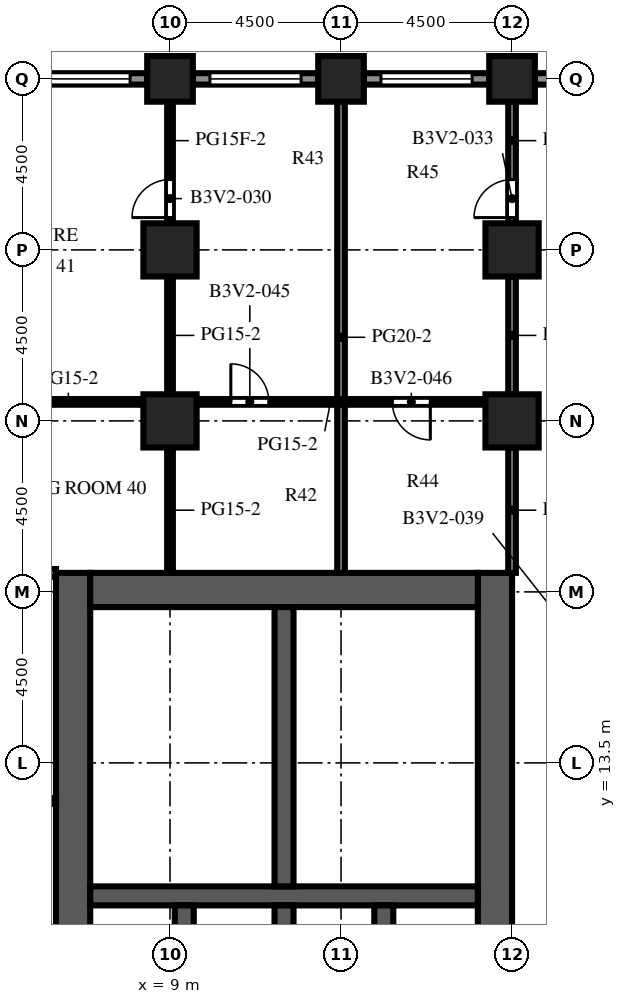
"""IFC4 building model, lengths in metres.
Left out: names, types, materials, properties, quantities, classifications, styles, units other than length and angle.
Written with IfcOpenShell. Run it as: python <this file> out.ifc"""

import sys

from ifc_helpers import new_model, si_unit, direction, frame, frame_2d, origin, origin_2d, place, context, subcontext, project, spatial, rectangle, extrude, element, fill, save


model = new_model("IFC4")
c1 = context("Model", 3, precision=1e-05, world=origin(), true_north=direction((0.0, 1.0)))
c2 = subcontext(c1, "Body", "Model", "MODEL_VIEW")
j1 = project(units=[si_unit("LENGTHUNIT", "METRE"), si_unit("PLANEANGLEUNIT", "RADIAN")], contexts=[c1])
p1 = place(None, origin())
s1 = spatial("IfcSite", under=j1, at=p1, CompositionType="ELEMENT")
p2 = place(p1, origin())
s2 = spatial("IfcBuilding", under=s1, at=p2, CompositionType="ELEMENT")
p3 = place(p2, frame((0.0, 0.0, 106.6)))
s3 = spatial("IfcBuildingStorey", under=s2, at=p3, CompositionType="ELEMENT", Elevation=106.6)
for number, where, z_axis, x_axis in (
    (1, (9.0, 31.5, 0.0), (0.0, 0.0, 1.0), (1.0, 0.0, 0.0)),
    (2, (13.5, 31.5, 0.0), (0.0, 0.0, 1.0), (1.0, 0.0, 0.0)),
    (3, (18.0, 31.5, 0.0), (0.0, 0.0, 1.0), (1.0, 0.0, 0.0)),
):
    element("IfcColumn", number, at=place(p3, frame(where, z_axis=z_axis, x_axis=x_axis)), inside=s3, PredefinedType="COLUMN", context=c2, shape_type="SweptSolid", body=[
        extrude(rectangle(XDim=1.2, YDim=1.2, at=origin_2d()), origin(), (0.0, 0.0, 1.0), 4.1),
    ])
for number, where, z_axis, x_axis in (
    (4, (9.0, 22.5, 0.0), (0.0, 0.0, 1.0), (1.0, 0.0, 0.0)),
    (5, (9.0, 27.0, 0.0), (0.0, 0.0, 1.0), (1.0, 0.0, 0.0)),
    (6, (18.0, 22.5, 0.0), (0.0, 0.0, 1.0), (1.0, 0.0, 0.0)),
    (7, (18.0, 27.0, 0.0), (0.0, 0.0, 1.0), (1.0, 0.0, 0.0)),
):
    element("IfcColumn", number, at=place(p3, frame(where, z_axis=z_axis, x_axis=x_axis)), inside=s3, PredefinedType="COLUMN", context=c2, shape_type="SweptSolid", body=[
        extrude(rectangle(XDim=1.4, YDim=1.4, at=origin_2d()), origin(), (0.0, 0.0, 1.0), 4.1),
    ])
p4 = place(p3, frame((6.45, -9.0, 0.0), z_axis=(0.0, 0.0, 1.0), x_axis=(0.0, 1.0, 0.0)))
e8 = element("IfcWall", 8, at=p4, inside=s3, PredefinedType="SHEAR", context=c2, shape_type="SweptSolid", body=[
    extrude(rectangle(XDim=27.5, YDim=0.9, at=frame_2d((13.75, 0.0))), origin(), (0.0, 0.0, 1.0), 4.1),
])
p5 = place(p4, frame((12.55, 0.0, 0.0)))
e9 = element("IfcOpeningElement", 9, at=p5, cuts=e8, PredefinedType="OPENING", context=c2, shape_type="SweptSolid", body=[
    extrude(rectangle(XDim=2.4, YDim=2.4, at=frame_2d((1.2, 1.2))), frame((0.0, 0.46, 0.0), z_axis=(0.0, -1.0, 0.0), x_axis=(1.0, 0.0, 0.0)), (0.0, 0.0, 1.0), 0.92),
])
p6 = place(p4, frame((3.893, 0.0, 0.0)))
e10 = element("IfcOpeningElement", 10, at=p6, cuts=e8, PredefinedType="OPENING", context=c2, shape_type="SweptSolid", body=[
    extrude(rectangle(XDim=0.923, YDim=2.1, at=frame_2d((0.461, 1.05))), frame((0.0, 0.46, 0.0), z_axis=(0.0, -1.0, 0.0), x_axis=(1.0, 0.0, 0.0)), (0.0, 0.0, 1.0), 0.92),
])
p7 = place(p4, frame((23.427, 0.0, 0.0)))
e11 = element("IfcOpeningElement", 11, at=p7, cuts=e8, PredefinedType="OPENING", context=c2, shape_type="SweptSolid", body=[
    extrude(rectangle(XDim=1.2, YDim=2.1, at=frame_2d((0.6, 1.05))), frame((0.0, 0.46, 0.0), z_axis=(0.0, -1.0, 0.0), x_axis=(1.0, 0.0, 0.0)), (0.0, 0.0, 1.0), 0.92),
])
p8 = place(p3, frame((17.55, -9.0, 0.0), z_axis=(0.0, 0.0, 1.0), x_axis=(0.0, 1.0, 0.0)))
e12 = element("IfcWall", 12, at=p8, inside=s3, PredefinedType="SHEAR", context=c2, shape_type="SweptSolid", body=[
    extrude(rectangle(XDim=27.5, YDim=0.9, at=frame_2d((13.75, 0.0))), origin(), (0.0, 0.0, 1.0), 4.1),
])
p9 = place(p8, frame((12.55, 0.0, 0.0)))
e13 = element("IfcOpeningElement", 13, at=p9, cuts=e12, PredefinedType="OPENING", context=c2, shape_type="SweptSolid", body=[
    extrude(rectangle(XDim=2.4, YDim=2.4, at=frame_2d((1.2, 1.2))), frame((0.0, 0.46, 0.0), z_axis=(0.0, -1.0, 0.0), x_axis=(1.0, 0.0, 0.0)), (0.0, 0.0, 1.0), 0.92),
])
p10 = place(p8, frame((6.825, 0.0, 0.0)))
e14 = element("IfcOpeningElement", 14, at=p10, cuts=e12, PredefinedType="OPENING", context=c2, shape_type="SweptSolid", body=[
    extrude(rectangle(XDim=1.2, YDim=2.1, at=frame_2d((0.6, 1.05))), frame((0.0, 0.46, 0.0), z_axis=(0.0, -1.0, 0.0), x_axis=(1.0, 0.0, 0.0)), (0.0, 0.0, 1.0), 0.92),
])
p11 = place(p8, frame((19.475, 0.0, 0.0)))
e15 = element("IfcOpeningElement", 15, at=p11, cuts=e12, PredefinedType="OPENING", context=c2, shape_type="SweptSolid", body=[
    extrude(rectangle(XDim=1.2, YDim=2.1, at=frame_2d((0.6, 1.05))), frame((0.0, 0.46, 0.0), z_axis=(0.0, -1.0, 0.0), x_axis=(1.0, 0.0, 0.0)), (0.0, 0.0, 1.0), 0.92),
])
p12 = place(p3, frame((6.9, 18.05, 0.0), z_axis=(0.0, 0.0, 1.0), x_axis=(1.0, 0.0, 0.0)))
e16 = element("IfcWall", 16, at=p12, inside=s3, PredefinedType="SHEAR", context=c2, shape_type="SweptSolid", body=[
    extrude(rectangle(XDim=10.2, YDim=0.9, at=frame_2d((5.1, 0.0))), origin(), (0.0, 0.0, 1.0), 4.1),
])
p13 = place(p3, frame((6.9, 10.0, 0.0), z_axis=(0.0, 0.0, 1.0), x_axis=(1.0, 0.0, 0.0)))
e17 = element("IfcWall", 17, at=p13, inside=s3, PredefinedType="SHEAR", context=c2, shape_type="SweptSolid", body=[
    extrude(rectangle(XDim=10.2, YDim=0.5, at=frame_2d((5.1, 0.0))), origin(), (0.0, 0.0, 1.0), 4.1),
])
for number, where, z_axis, x_axis in (
    (18, (9.375, 6.95, 0.0), (0.0, 0.0, 1.0), (0.0, 1.0, 0.0)),
    (19, (12.0, 6.95, 0.0), (0.0, 0.0, 1.0), (0.0, 1.0, 0.0)),
    (20, (14.625, 6.95, 0.0), (0.0, 0.0, 1.0), (0.0, 1.0, 0.0)),
):
    element("IfcWall", number, at=place(p3, frame(where, z_axis=z_axis, x_axis=x_axis)), inside=s3, PredefinedType="SHEAR", context=c2, shape_type="SweptSolid", body=[
        extrude(rectangle(XDim=2.8, YDim=0.5, at=frame_2d((1.4, 0.0))), origin(), (0.0, 0.0, 1.0), 4.1),
    ])
p14 = place(p3, frame((12.0, 10.25, 0.0), z_axis=(0.0, 0.0, 1.0), x_axis=(0.0, 1.0, 0.0)))
e21 = element("IfcWall", 21, at=p14, inside=s3, PredefinedType="SHEAR", context=c2, shape_type="SweptSolid", body=[
    extrude(rectangle(XDim=7.35, YDim=0.5, at=frame_2d((3.675, 0.0))), origin(), (0.0, 0.0, 1.0), 4.1),
])
p15 = place(p3, frame((18.6, 31.5, 0.0), z_axis=(0.0, 0.0, 1.0), x_axis=(1.0, 0.0, 0.0)))
e22 = element("IfcWall", 22, at=p15, inside=s3, PredefinedType="SOLIDWALL", context=c2, shape_type="SweptSolid", body=[
    extrude(rectangle(XDim=3.3, YDim=0.3, at=frame_2d((1.65, 0.0))), origin(), (0.0, 0.0, 1.0), 2.6),
])
p16 = place(p15, frame((1.15, 0.0, 0.0)))
e23 = element("IfcOpeningElement", 23, at=p16, cuts=e22, PredefinedType="OPENING", context=c2, shape_type="SweptSolid", body=[
    extrude(rectangle(XDim=1.0, YDim=2.2, at=frame_2d((0.5, 1.1))), frame((0.0, 0.16, 0.0), z_axis=(0.0, -1.0, 0.0), x_axis=(1.0, 0.0, 0.0)), (0.0, 0.0, 1.0), 0.32),
])
p17 = place(p3, frame((14.1, 31.5, 0.0), z_axis=(0.0, 0.0, 1.0), x_axis=(1.0, 0.0, 0.0)))
e24 = element("IfcWall", 24, at=p17, inside=s3, PredefinedType="SOLIDWALL", context=c2, shape_type="SweptSolid", body=[
    extrude(rectangle(XDim=3.3, YDim=0.3, at=frame_2d((1.65, 0.0))), origin(), (0.0, 0.0, 1.0), 2.6),
])
p18 = place(p17, frame((0.45, 0.0, 0.8)))
e25 = element("IfcOpeningElement", 25, at=p18, cuts=e24, PredefinedType="OPENING", context=c2, shape_type="SweptSolid", body=[
    extrude(rectangle(XDim=2.4, YDim=1.7, at=frame_2d((1.2, 0.85))), frame((0.0, 0.16, 0.0), z_axis=(0.0, -1.0, 0.0), x_axis=(1.0, 0.0, 0.0)), (0.0, 0.0, 1.0), 0.32),
])
p19 = place(p3, frame((9.6, 31.5, 0.0), z_axis=(0.0, 0.0, 1.0), x_axis=(1.0, 0.0, 0.0)))
e26 = element("IfcWall", 26, at=p19, inside=s3, PredefinedType="SOLIDWALL", context=c2, shape_type="SweptSolid", body=[
    extrude(rectangle(XDim=3.3, YDim=0.3, at=frame_2d((1.65, 0.0))), origin(), (0.0, 0.0, 1.0), 2.6),
])
p20 = place(p19, frame((0.45, 0.0, 0.8)))
e27 = element("IfcOpeningElement", 27, at=p20, cuts=e26, PredefinedType="OPENING", context=c2, shape_type="SweptSolid", body=[
    extrude(rectangle(XDim=2.4, YDim=1.7, at=frame_2d((1.2, 0.85))), frame((0.0, 0.16, 0.0), z_axis=(0.0, -1.0, 0.0), x_axis=(1.0, 0.0, 0.0)), (0.0, 0.0, 1.0), 0.32),
])
p21 = place(p3, frame((5.1, 31.5, 0.0), z_axis=(0.0, 0.0, 1.0), x_axis=(1.0, 0.0, 0.0)))
e28 = element("IfcWall", 28, at=p21, inside=s3, PredefinedType="SOLIDWALL", context=c2, shape_type="SweptSolid", body=[
    extrude(rectangle(XDim=3.3, YDim=0.3, at=frame_2d((1.65, 0.0))), origin(), (0.0, 0.0, 1.0), 2.6),
])
p22 = place(p21, frame((0.45, 0.0, 0.8)))
e29 = element("IfcOpeningElement", 29, at=p22, cuts=e28, PredefinedType="OPENING", context=c2, shape_type="SweptSolid", body=[
    extrude(rectangle(XDim=2.4, YDim=1.7, at=frame_2d((1.2, 0.85))), frame((0.0, 0.16, 0.0), z_axis=(0.0, -1.0, 0.0), x_axis=(1.0, 0.0, 0.0)), (0.0, 0.0, 1.0), 0.32),
])
p23 = place(p3, frame((6.9, 12.455, 0.0), z_axis=(0.0, 0.0, 1.0), x_axis=(1.0, 0.0, 0.0)))
e30 = element("IfcWall", 30, at=p23, inside=s3, PredefinedType="PARTITIONING", context=c2, shape_type="SweptSolid", body=[
    extrude(rectangle(XDim=1.3, YDim=0.1, at=frame_2d((0.65, 0.0))), origin(), (0.0, 0.0, 1.0), 3.5),
])
p24 = place(p23, frame((0.2, 0.0, 0.0)))
e31 = element("IfcOpeningElement", 31, at=p24, cuts=e30, PredefinedType="OPENING", context=c2, shape_type="SweptSolid", body=[
    extrude(rectangle(XDim=0.9, YDim=2.1, at=frame_2d((0.45, 1.05))), frame((0.0, 0.06, 0.0), z_axis=(0.0, -1.0, 0.0), x_axis=(1.0, 0.0, 0.0)), (0.0, 0.0, 1.0), 0.12),
])
p25 = place(p3, frame((8.2, 12.455, 0.0), z_axis=(0.0, 0.0, 1.0), x_axis=(1.0, 0.0, 0.0)))
e32 = element("IfcWall", 32, at=p25, inside=s3, PredefinedType="PARTITIONING", context=c2, shape_type="SweptSolid", body=[
    extrude(rectangle(XDim=3.55, YDim=0.1, at=frame_2d((1.775, 0.0))), origin(), (0.0, 0.0, 1.0), 3.5),
])
p26 = place(p3, frame((8.2, 12.455, 0.0), z_axis=(0.0, 0.0, 1.0), x_axis=(0.0, 1.0, 0.0)))
e33 = element("IfcWall", 33, at=p26, inside=s3, PredefinedType="PARTITIONING", context=c2, shape_type="SweptSolid", body=[
    extrude(rectangle(XDim=2.573, YDim=0.1, at=frame_2d((1.286, 0.0))), origin(), (0.0, 0.0, 1.0), 3.5),
])
p27 = place(p26, frame((0.786, 0.0, 0.0)))
e34 = element("IfcOpeningElement", 34, at=p27, cuts=e33, PredefinedType="OPENING", context=c2, shape_type="SweptSolid", body=[
    extrude(rectangle(XDim=1.0, YDim=2.1, at=frame_2d((0.5, 1.05))), frame((0.0, 0.06, 0.0), z_axis=(0.0, -1.0, 0.0), x_axis=(1.0, 0.0, 0.0)), (0.0, 0.0, 1.0), 0.12),
])
p28 = place(p3, frame((8.2, 15.028, 0.0), z_axis=(0.0, 0.0, 1.0), x_axis=(0.0, 1.0, 0.0)))
e35 = element("IfcWall", 35, at=p28, inside=s3, PredefinedType="PARTITIONING", context=c2, shape_type="SweptSolid", body=[
    extrude(rectangle(XDim=2.573, YDim=0.1, at=frame_2d((1.286, 0.0))), origin(), (0.0, 0.0, 1.0), 3.5),
])
p29 = place(p28, frame((0.786, 0.0, 0.0)))
e36 = element("IfcOpeningElement", 36, at=p29, cuts=e35, PredefinedType="OPENING", context=c2, shape_type="SweptSolid", body=[
    extrude(rectangle(XDim=1.0, YDim=2.1, at=frame_2d((0.5, 1.05))), frame((0.0, 0.06, 0.0), z_axis=(0.0, -1.0, 0.0), x_axis=(1.0, 0.0, 0.0)), (0.0, 0.0, 1.0), 0.12),
])
p30 = place(p3, frame((8.2, 15.028, 0.0), z_axis=(0.0, 0.0, 1.0), x_axis=(1.0, 0.0, 0.0)))
e37 = element("IfcWall", 37, at=p30, inside=s3, PredefinedType="PARTITIONING", context=c2, shape_type="SweptSolid", body=[
    extrude(rectangle(XDim=3.55, YDim=0.1, at=frame_2d((1.775, 0.0))), origin(), (0.0, 0.0, 1.0), 3.5),
])
p31 = place(p3, frame((9.0, 18.5, 0.0), z_axis=(0.0, 0.0, 1.0), x_axis=(0.0, 1.0, 0.0)))
e38 = element("IfcWall", 38, at=p31, inside=s3, PredefinedType="PARTITIONING", context=c2, shape_type="SweptSolid", body=[
    extrude(rectangle(XDim=3.3, YDim=0.15, at=frame_2d((1.65, 0.0))), origin(), (0.0, 0.0, 1.0), 3.5),
])
p32 = place(p3, frame((9.0, 23.2, 0.0), z_axis=(0.0, 0.0, 1.0), x_axis=(0.0, 1.0, 0.0)))
e39 = element("IfcWall", 39, at=p32, inside=s3, PredefinedType="PARTITIONING", context=c2, shape_type="SweptSolid", body=[
    extrude(rectangle(XDim=3.1, YDim=0.15, at=frame_2d((1.55, 0.0))), origin(), (0.0, 0.0, 1.0), 3.5),
])
p33 = place(p3, frame((9.0, 30.9, 0.0), z_axis=(0.0, 0.0, 1.0), x_axis=(0.0, -1.0, 0.0)))
e40 = element("IfcWall", 40, at=p33, inside=s3, PredefinedType="PARTITIONING", context=c2, shape_type="SweptSolid", body=[
    extrude(rectangle(XDim=3.2, YDim=0.15, at=frame_2d((1.6, 0.0))), origin(), (0.0, 0.0, 1.0), 3.5),
])
p34 = place(p33, frame((2.05, 0.0, 0.0)))
e41 = element("IfcOpeningElement", 41, at=p34, cuts=e40, PredefinedType="OPENING", context=c2, shape_type="SweptSolid", body=[
    extrude(rectangle(XDim=1.0, YDim=2.1, at=frame_2d((0.5, 1.05))), frame((0.0, 0.085, 0.0), z_axis=(0.0, -1.0, 0.0), x_axis=(1.0, 0.0, 0.0)), (0.0, 0.0, 1.0), 0.17),
])
p35 = place(p3, frame((13.5, 18.5, 0.0), z_axis=(0.0, 0.0, 1.0), x_axis=(0.0, 1.0, 0.0)))
e42 = element("IfcWall", 42, at=p35, inside=s3, PredefinedType="PARTITIONING", context=c2, shape_type="SweptSolid", body=[
    extrude(rectangle(XDim=12.4, YDim=0.2, at=frame_2d((6.2, 0.0))), origin(), (0.0, 0.0, 1.0), 3.5),
])
p36 = place(p3, frame((18.0, 18.5, 0.0), z_axis=(0.0, 0.0, 1.0), x_axis=(0.0, 1.0, 0.0)))
e43 = element("IfcWall", 43, at=p36, inside=s3, PredefinedType="PARTITIONING", context=c2, shape_type="SweptSolid", body=[
    extrude(rectangle(XDim=3.3, YDim=0.2, at=frame_2d((1.65, 0.0))), origin(), (0.0, 0.0, 1.0), 3.5),
])
p37 = place(p3, frame((18.0, 23.2, 0.0), z_axis=(0.0, 0.0, 1.0), x_axis=(0.0, 1.0, 0.0)))
e44 = element("IfcWall", 44, at=p37, inside=s3, PredefinedType="PARTITIONING", context=c2, shape_type="SweptSolid", body=[
    extrude(rectangle(XDim=3.1, YDim=0.2, at=frame_2d((1.55, 0.0))), origin(), (0.0, 0.0, 1.0), 3.5),
])
p38 = place(p3, frame((18.0, 27.7, 0.0), z_axis=(0.0, 0.0, 1.0), x_axis=(0.0, 1.0, 0.0)))
e45 = element("IfcWall", 45, at=p38, inside=s3, PredefinedType="PARTITIONING", context=c2, shape_type="SweptSolid", body=[
    extrude(rectangle(XDim=3.2, YDim=0.2, at=frame_2d((1.6, 0.0))), origin(), (0.0, 0.0, 1.0), 3.5),
])
p39 = place(p38, frame((0.15, 0.0, 0.0)))
e46 = element("IfcOpeningElement", 46, at=p39, cuts=e45, PredefinedType="OPENING", context=c2, shape_type="SweptSolid", body=[
    extrude(rectangle(XDim=1.0, YDim=2.1, at=frame_2d((0.5, 1.05))), frame((0.0, 0.11, 0.0), z_axis=(0.0, -1.0, 0.0), x_axis=(1.0, 0.0, 0.0)), (0.0, 0.0, 1.0), 0.22),
])
p40 = place(p3, frame((1.5, 12.5, 0.0), z_axis=(0.0, 0.0, 1.0), x_axis=(1.0, 0.0, 0.0)))
e47 = element("IfcWall", 47, at=p40, inside=s3, PredefinedType="PARTITIONING", context=c2, shape_type="SweptSolid", body=[
    extrude(rectangle(XDim=4.5, YDim=0.15, at=frame_2d((2.25, 0.0))), origin(), (0.0, 0.0, 1.0), 3.5),
])
p41 = place(p40, frame((1.85, 0.0, 0.0)))
e48 = element("IfcOpeningElement", 48, at=p41, cuts=e47, PredefinedType="OPENING", context=c2, shape_type="SweptSolid", body=[
    extrude(rectangle(XDim=1.0, YDim=2.1, at=frame_2d((0.5, 1.05))), frame((0.0, 0.085, 0.0), z_axis=(0.0, -1.0, 0.0), x_axis=(1.0, 0.0, 0.0)), (0.0, 0.0, 1.0), 0.17),
])
p42 = place(p3, frame((1.5, 18.5, 0.0), z_axis=(0.0, 0.0, 1.0), x_axis=(1.0, 0.0, 0.0)))
e49 = element("IfcWall", 49, at=p42, inside=s3, PredefinedType="PARTITIONING", context=c2, shape_type="SweptSolid", body=[
    extrude(rectangle(XDim=4.5, YDim=0.2, at=frame_2d((2.25, 0.0))), origin(), (0.0, 0.0, 1.0), 3.5),
])
p43 = place(p3, frame((8.3, 23.0, 0.0), z_axis=(0.0, 0.0, 1.0), x_axis=(-1.0, 0.0, 0.0)))
e50 = element("IfcWall", 50, at=p43, inside=s3, PredefinedType="PARTITIONING", context=c2, shape_type="SweptSolid", body=[
    extrude(rectangle(XDim=7.6, YDim=0.15, at=frame_2d((3.8, 0.0))), origin(), (0.0, 0.0, 1.0), 3.5),
])
p44 = place(p43, frame((3.95, 0.0, 0.0)))
e51 = element("IfcOpeningElement", 51, at=p44, cuts=e50, PredefinedType="OPENING", context=c2, shape_type="SweptSolid", body=[
    extrude(rectangle(XDim=1.0, YDim=2.1, at=frame_2d((0.5, 1.05))), frame((0.0, 0.085, 0.0), z_axis=(0.0, -1.0, 0.0), x_axis=(1.0, 0.0, 0.0)), (0.0, 0.0, 1.0), 0.17),
])
p45 = place(p3, frame((17.3, 23.0, 0.0), z_axis=(0.0, 0.0, 1.0), x_axis=(-1.0, 0.0, 0.0)))
e52 = element("IfcWall", 52, at=p45, inside=s3, PredefinedType="PARTITIONING", context=c2, shape_type="SweptSolid", body=[
    extrude(rectangle(XDim=7.6, YDim=0.15, at=frame_2d((3.8, 0.0))), origin(), (0.0, 0.0, 1.0), 3.5),
])
p46 = place(p45, frame((5.7, 0.0, 0.0)))
e53 = element("IfcOpeningElement", 53, at=p46, cuts=e52, PredefinedType="OPENING", context=c2, shape_type="SweptSolid", body=[
    extrude(rectangle(XDim=1.0, YDim=2.1, at=frame_2d((0.5, 1.05))), frame((0.0, 0.085, 0.0), z_axis=(0.0, -1.0, 0.0), x_axis=(1.0, 0.0, 0.0)), (0.0, 0.0, 1.0), 0.17),
])
p47 = place(p45, frame((1.45, 0.0, 0.0)))
e54 = element("IfcOpeningElement", 54, at=p47, cuts=e52, PredefinedType="OPENING", context=c2, shape_type="SweptSolid", body=[
    extrude(rectangle(XDim=1.0, YDim=2.1, at=frame_2d((0.5, 1.05))), frame((0.0, 0.085, 0.0), z_axis=(0.0, -1.0, 0.0), x_axis=(1.0, 0.0, 0.0)), (0.0, 0.0, 1.0), 0.17),
])
p48 = place(p18, origin())
e55 = element("IfcWindow", 55, at=p48, inside=s3, PartitioningType="SINGLE_PANEL", PredefinedType="WINDOW", context=c2, shape_type="SweptSolid", body=[
    extrude(rectangle(XDim=2.4, YDim=1.7, at=frame_2d((1.2, 0.85))), frame((0.0, 0.03, 0.0), z_axis=(0.0, -1.0, 0.0), x_axis=(1.0, 0.0, 0.0)), (0.0, 0.0, 1.0), 0.06),
])
fill(e25, e55)
p49 = place(p20, origin())
e56 = element("IfcWindow", 56, at=p49, inside=s3, PartitioningType="SINGLE_PANEL", PredefinedType="WINDOW", context=c2, shape_type="SweptSolid", body=[
    extrude(rectangle(XDim=2.4, YDim=1.7, at=frame_2d((1.2, 0.85))), frame((0.0, 0.03, 0.0), z_axis=(0.0, -1.0, 0.0), x_axis=(1.0, 0.0, 0.0)), (0.0, 0.0, 1.0), 0.06),
])
fill(e27, e56)
p50 = place(p22, origin())
e57 = element("IfcWindow", 57, at=p50, inside=s3, PartitioningType="SINGLE_PANEL", PredefinedType="WINDOW", context=c2, shape_type="SweptSolid", body=[
    extrude(rectangle(XDim=2.4, YDim=1.7, at=frame_2d((1.2, 0.85))), frame((0.0, 0.03, 0.0), z_axis=(0.0, -1.0, 0.0), x_axis=(1.0, 0.0, 0.0)), (0.0, 0.0, 1.0), 0.06),
])
fill(e29, e57)
p51 = place(p11, frame((1.2, 0.0, 0.0), z_axis=(0.0, 0.0, 1.0), x_axis=(-1.0, 0.0, 0.0)))
e58 = element("IfcDoor", 58, at=p51, inside=s3, OperationType="SINGLE_SWING_LEFT", PredefinedType="DOOR", context=c2, shape_type="SweptSolid", body=[
    extrude(rectangle(XDim=1.2, YDim=2.1, at=frame_2d((0.6, 1.05))), frame((0.0, 0.025, 0.0), z_axis=(0.0, -1.0, 0.0), x_axis=(1.0, 0.0, 0.0)), (0.0, 0.0, 1.0), 0.05),
])
fill(e15, e58)
p52 = place(p24, origin())
e59 = element("IfcDoor", 59, at=p52, inside=s3, OperationType="SINGLE_SWING_RIGHT", PredefinedType="DOOR", context=c2, shape_type="SweptSolid", body=[
    extrude(rectangle(XDim=0.9, YDim=2.1, at=frame_2d((0.45, 1.05))), frame((0.0, 0.025, 0.0), z_axis=(0.0, -1.0, 0.0), x_axis=(1.0, 0.0, 0.0)), (0.0, 0.0, 1.0), 0.05),
])
fill(e31, e59)
p53 = place(p7, origin())
e60 = element("IfcDoor", 60, at=p53, inside=s3, OperationType="SINGLE_SWING_LEFT", PredefinedType="DOOR", context=c2, shape_type="SweptSolid", body=[
    extrude(rectangle(XDim=1.2, YDim=2.1, at=frame_2d((0.6, 1.05))), frame((0.0, -0.375, 0.0), z_axis=(0.0, -1.0, 0.0), x_axis=(1.0, 0.0, 0.0)), (0.0, 0.0, 1.0), 0.05),
])
fill(e11, e60)
p54 = place(p27, origin())
e61 = element("IfcDoor", 61, at=p54, inside=s3, OperationType="SINGLE_SWING_RIGHT", PredefinedType="DOOR", context=c2, shape_type="SweptSolid", body=[
    extrude(rectangle(XDim=1.0, YDim=2.1, at=frame_2d((0.5, 1.05))), frame((0.0, 0.025, 0.0), z_axis=(0.0, -1.0, 0.0), x_axis=(1.0, 0.0, 0.0)), (0.0, 0.0, 1.0), 0.05),
])
fill(e34, e61)
p55 = place(p29, origin())
e62 = element("IfcDoor", 62, at=p55, inside=s3, OperationType="SINGLE_SWING_LEFT", PredefinedType="DOOR", context=c2, shape_type="SweptSolid", body=[
    extrude(rectangle(XDim=1.0, YDim=2.1, at=frame_2d((0.5, 1.05))), frame((0.0, 0.025, 0.0), z_axis=(0.0, -1.0, 0.0), x_axis=(1.0, 0.0, 0.0)), (0.0, 0.0, 1.0), 0.05),
])
fill(e36, e62)
p56 = place(p34, origin())
e63 = element("IfcDoor", 63, at=p56, inside=s3, OperationType="SINGLE_SWING_RIGHT", PredefinedType="DOOR", context=c2, shape_type="SweptSolid", body=[
    extrude(rectangle(XDim=1.0, YDim=2.1, at=frame_2d((0.5, 1.05))), frame((0.0, 0.025, 0.0), z_axis=(0.0, -1.0, 0.0), x_axis=(1.0, 0.0, 0.0)), (0.0, 0.0, 1.0), 0.05),
])
fill(e41, e63)
p57 = place(p39, origin())
e64 = element("IfcDoor", 64, at=p57, inside=s3, OperationType="SINGLE_SWING_LEFT", PredefinedType="DOOR", context=c2, shape_type="SweptSolid", body=[
    extrude(rectangle(XDim=1.0, YDim=2.1, at=frame_2d((0.5, 1.05))), frame((0.0, 0.025, 0.0), z_axis=(0.0, -1.0, 0.0), x_axis=(1.0, 0.0, 0.0)), (0.0, 0.0, 1.0), 0.05),
])
fill(e46, e64)
p58 = place(p46, origin())
e65 = element("IfcDoor", 65, at=p58, inside=s3, OperationType="SINGLE_SWING_RIGHT", PredefinedType="DOOR", context=c2, shape_type="SweptSolid", body=[
    extrude(rectangle(XDim=1.0, YDim=2.1, at=frame_2d((0.5, 1.05))), frame((0.0, 0.025, 0.0), z_axis=(0.0, -1.0, 0.0), x_axis=(1.0, 0.0, 0.0)), (0.0, 0.0, 1.0), 0.05),
])
fill(e53, e65)
p59 = place(p47, origin())
e66 = element("IfcDoor", 66, at=p59, inside=s3, OperationType="SINGLE_SWING_LEFT", PredefinedType="DOOR", context=c2, shape_type="SweptSolid", body=[
    extrude(rectangle(XDim=1.0, YDim=2.1, at=frame_2d((0.5, 1.05))), frame((0.0, 0.025, 0.0), z_axis=(0.0, -1.0, 0.0), x_axis=(1.0, 0.0, 0.0)), (0.0, 0.0, 1.0), 0.05),
])
fill(e54, e66)
save(model, sys.argv[1])
